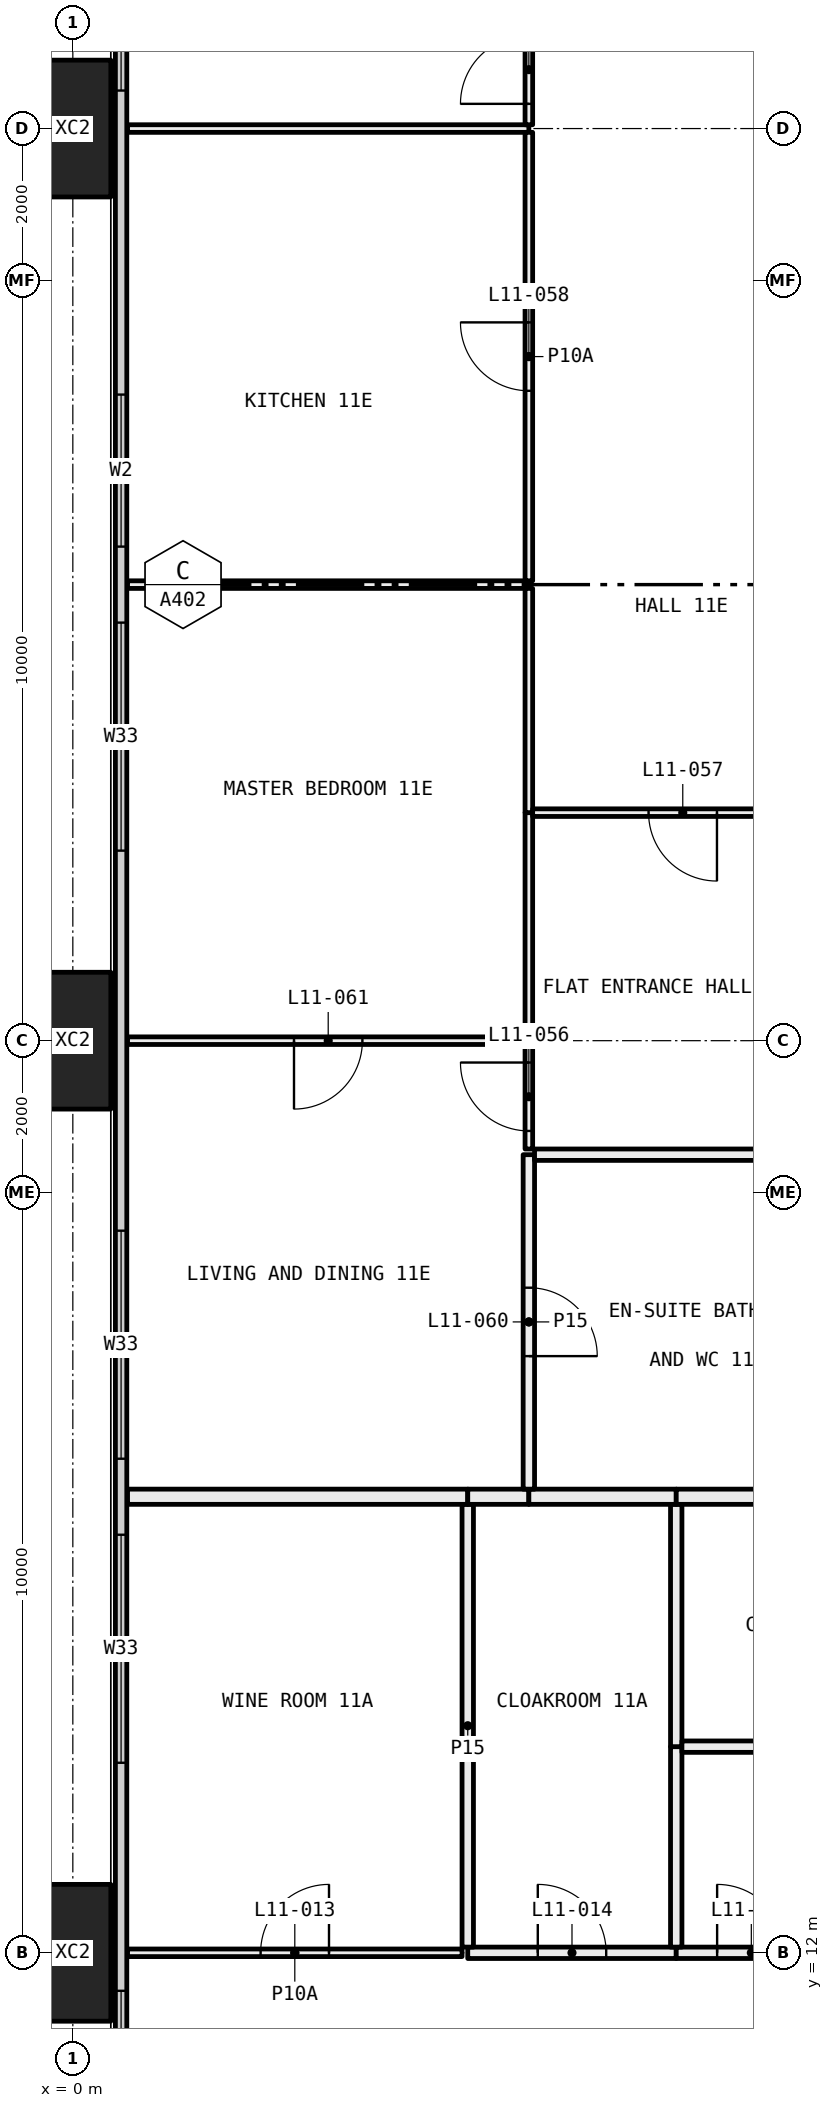
"""IFC4 building model, lengths in metres.
Left out: names, types, materials, properties, quantities, classifications, styles, units other than length and angle.
Written with IfcOpenShell. Run it as: python <this file> out.ifc"""

import sys

from ifc_helpers import new_model, si_unit, direction, frame, frame_2d, origin, origin_2d, place, context, subcontext, project, spatial, rectangle, hollow_rectangle, extrude, element, fill, save


model = new_model("IFC4")
c1 = context("Model", 3, precision=1e-05, world=origin(), true_north=direction((0.0, 1.0)))
c2 = subcontext(c1, "Body", "Model", "MODEL_VIEW")
j1 = project(units=[si_unit("LENGTHUNIT", "METRE"), si_unit("PLANEANGLEUNIT", "RADIAN")], contexts=[c1])
p1 = place(None, origin())
s1 = spatial("IfcSite", under=j1, at=p1, CompositionType="ELEMENT")
p2 = place(p1, origin())
s2 = spatial("IfcBuilding", under=s1, at=p2, CompositionType="ELEMENT")
p3 = place(p2, frame((0.0, 0.0, 50.7)))
s3 = spatial("IfcBuildingStorey", under=s2, at=p3, CompositionType="ELEMENT", Elevation=50.7)
for number, where, z_axis, x_axis in (
    (1, (0.0, 12.0, -0.4), (0.0, 0.0, 1.0), (0.0, 1.0, 0.0)),
    (2, (0.0, 24.0, -0.4), (0.0, 0.0, 1.0), (0.0, 1.0, 0.0)),
    (3, (0.0, 36.0, -0.4), (0.0, 0.0, 1.0), (0.0, 1.0, 0.0)),
):
    element("IfcColumn", number, at=place(p3, frame(where, z_axis=z_axis, x_axis=x_axis)), inside=s3, PredefinedType="COLUMN", context=c2, shape_type="SweptSolid", body=[
        extrude(hollow_rectangle(XDim=1.8, YDim=1.0, WallThickness=0.07, at=origin_2d()), origin(), (0.0, 0.0, 1.0), 3.45),
    ])
p4 = place(p3, frame((0.635, 6.71, 0.0), z_axis=(0.0, 0.0, 1.0), x_axis=(0.0, 1.0, 0.0)))
e4 = element("IfcWall", 4, at=p4, inside=s3, PredefinedType="ELEMENTEDWALL", context=c2, shape_type="SweptSolid", body=[
    extrude(rectangle(XDim=34.58, YDim=0.15, at=frame_2d((17.29, 0.0))), origin(), (0.0, 0.0, 1.0), 3.05),
])
p5 = place(p4, frame((0.29, 0.0, 0.45)))
e5 = element("IfcOpeningElement", 5, at=p5, cuts=e4, PredefinedType="OPENING", context=c2, shape_type="SweptSolid", body=[
    extrude(rectangle(XDim=4.5, YDim=2.55, at=frame_2d((2.25, 1.275))), frame((0.0, 0.085, 0.0), z_axis=(0.0, -1.0, 0.0), x_axis=(1.0, 0.0, 0.0)), (0.0, 0.0, 1.0), 0.17),
])
p6 = place(p4, frame((7.79, 0.0, 0.45)))
e6 = element("IfcOpeningElement", 6, at=p6, cuts=e4, PredefinedType="OPENING", context=c2, shape_type="SweptSolid", body=[
    extrude(rectangle(XDim=3.0, YDim=2.55, at=frame_2d((1.5, 1.275))), frame((0.0, 0.085, 0.0), z_axis=(0.0, -1.0, 0.0), x_axis=(1.0, 0.0, 0.0)), (0.0, 0.0, 1.0), 0.17),
])
p7 = place(p4, frame((11.79, 0.0, 0.45)))
e7 = element("IfcOpeningElement", 7, at=p7, cuts=e4, PredefinedType="OPENING", context=c2, shape_type="SweptSolid", body=[
    extrude(rectangle(XDim=3.0, YDim=2.55, at=frame_2d((1.5, 1.275))), frame((0.0, 0.085, 0.0), z_axis=(0.0, -1.0, 0.0), x_axis=(1.0, 0.0, 0.0)), (0.0, 0.0, 1.0), 0.17),
])
p8 = place(p4, frame((19.79, 0.0, 0.45)))
e8 = element("IfcOpeningElement", 8, at=p8, cuts=e4, PredefinedType="OPENING", context=c2, shape_type="SweptSolid", body=[
    extrude(rectangle(XDim=3.0, YDim=2.55, at=frame_2d((1.5, 1.275))), frame((0.0, 0.085, 0.0), z_axis=(0.0, -1.0, 0.0), x_axis=(1.0, 0.0, 0.0)), (0.0, 0.0, 1.0), 0.17),
])
p9 = place(p4, frame((23.79, 0.0, 0.45)))
e9 = element("IfcOpeningElement", 9, at=p9, cuts=e4, PredefinedType="OPENING", context=c2, shape_type="SweptSolid", body=[
    extrude(rectangle(XDim=2.0, YDim=2.55, at=frame_2d((1.0, 1.275))), frame((0.0, 0.085, 0.0), z_axis=(0.0, -1.0, 0.0), x_axis=(1.0, 0.0, 0.0)), (0.0, 0.0, 1.0), 0.17),
])
p10 = place(p4, frame((29.79, 0.0, 0.45)))
e10 = element("IfcOpeningElement", 10, at=p10, cuts=e4, PredefinedType="OPENING", context=c2, shape_type="SweptSolid", body=[
    extrude(rectangle(XDim=4.5, YDim=2.55, at=frame_2d((2.25, 1.275))), frame((0.0, 0.085, 0.0), z_axis=(0.0, -1.0, 0.0), x_axis=(1.0, 0.0, 0.0)), (0.0, 0.0, 1.0), 0.17),
])
p11 = place(p3, frame((5.121, 12.0, 0.0), z_axis=(0.0, 0.0, 1.0), x_axis=(-1.0, 0.0, 0.0)))
e11 = element("IfcWall", 11, at=p11, inside=s3, PredefinedType="PARTITIONING", context=c2, shape_type="SweptSolid", body=[
    extrude(rectangle(XDim=4.401, YDim=0.1, at=frame_2d((2.201, 0.0))), origin(), (0.0, 0.0, 1.0), 2.45),
])
p12 = place(p11, frame((1.75, 0.0, 0.0)))
e12 = element("IfcOpeningElement", 12, at=p12, cuts=e11, PredefinedType="OPENING", context=c2, shape_type="SweptSolid", body=[
    extrude(rectangle(XDim=0.9, YDim=2.1, at=frame_2d((0.45, 1.05))), frame((0.0, 0.06, 0.0), z_axis=(0.0, -1.0, 0.0), x_axis=(1.0, 0.0, 0.0)), (0.0, 0.0, 1.0), 0.12),
])
p13 = place(p3, frame((7.939, 12.0, 0.0), z_axis=(0.0, 0.0, 1.0), x_axis=(-1.0, 0.0, 0.0)))
e13 = element("IfcWall", 13, at=p13, inside=s3, PredefinedType="PARTITIONING", context=c2, shape_type="SweptSolid", body=[
    extrude(rectangle(XDim=2.743, YDim=0.15, at=frame_2d((1.372, 0.0))), origin(), (0.0, 0.0, 1.0), 2.45),
])
p14 = place(p13, frame((0.921, 0.0, 0.0)))
e14 = element("IfcOpeningElement", 14, at=p14, cuts=e13, PredefinedType="OPENING", context=c2, shape_type="SweptSolid", body=[
    extrude(rectangle(XDim=0.9, YDim=2.1, at=frame_2d((0.45, 1.05))), frame((0.0, 0.085, 0.0), z_axis=(0.0, -1.0, 0.0), x_axis=(1.0, 0.0, 0.0)), (0.0, 0.0, 1.0), 0.17),
])
p15 = place(p3, frame((9.915, 12.0, 0.0), z_axis=(0.0, 0.0, 1.0), x_axis=(-1.0, 0.0, 0.0)))
e15 = element("IfcWall", 15, at=p15, inside=s3, PredefinedType="PARTITIONING", context=c2, shape_type="SweptSolid", body=[
    extrude(rectangle(XDim=1.976, YDim=0.15, at=frame_2d((0.988, 0.0))), origin(), (0.0, 0.0, 1.0), 2.45),
])
p16 = place(p15, frame((0.538, 0.0, 0.0)))
e16 = element("IfcOpeningElement", 16, at=p16, cuts=e15, PredefinedType="OPENING", context=c2, shape_type="SweptSolid", body=[
    extrude(rectangle(XDim=0.9, YDim=2.1, at=frame_2d((0.45, 1.05))), frame((0.0, 0.085, 0.0), z_axis=(0.0, -1.0, 0.0), x_axis=(1.0, 0.0, 0.0)), (0.0, 0.0, 1.0), 0.17),
])
p17 = place(p3, frame((5.196, 12.075, 0.0), z_axis=(0.0, 0.0, 1.0), x_axis=(0.0, 1.0, 0.0)))
e17 = element("IfcWall", 17, at=p17, inside=s3, PredefinedType="PARTITIONING", context=c2, shape_type="SweptSolid", body=[
    extrude(rectangle(XDim=5.825, YDim=0.15, at=frame_2d((2.913, 0.0))), origin(), (0.0, 0.0, 1.0), 2.45),
])
p18 = place(p3, frame((5.196, 18.0, 0.0), z_axis=(0.0, 0.0, 1.0), x_axis=(-1.0, 0.0, 0.0)))
e18 = element("IfcWall", 18, at=p18, inside=s3, PredefinedType="PARTITIONING", context=c2, shape_type="SweptSolid", body=[
    extrude(rectangle(XDim=4.476, YDim=0.2, at=frame_2d((2.238, 0.0))), origin(), (0.0, 0.0, 1.0), 3.05),
])
p19 = place(p3, frame((7.939, 12.075, 0.0), z_axis=(0.0, 0.0, 1.0), x_axis=(0.0, 1.0, 0.0)))
e19 = element("IfcWall", 19, at=p19, inside=s3, PredefinedType="PARTITIONING", context=c2, shape_type="SweptSolid", body=[
    extrude(rectangle(XDim=2.637, YDim=0.15, at=frame_2d((1.318, 0.0))), origin(), (0.0, 0.0, 1.0), 2.45),
])
p20 = place(p3, frame((7.939, 14.712, 0.0), z_axis=(0.0, 0.0, 1.0), x_axis=(0.0, 1.0, 0.0)))
e20 = element("IfcWall", 20, at=p20, inside=s3, PredefinedType="PARTITIONING", context=c2, shape_type="SweptSolid", body=[
    extrude(rectangle(XDim=3.188, YDim=0.15, at=frame_2d((1.594, 0.0))), origin(), (0.0, 0.0, 1.0), 3.05),
])
p21 = place(p3, frame((6.0, 18.0, 0.0), z_axis=(0.0, 0.0, 1.0), x_axis=(-1.0, 0.0, 0.0)))
e21 = element("IfcWall", 21, at=p21, inside=s3, PredefinedType="PARTITIONING", context=c2, shape_type="SweptSolid", body=[
    extrude(rectangle(XDim=0.804, YDim=0.2, at=frame_2d((0.402, 0.0))), origin(), (0.0, 0.0, 1.0), 3.05),
])
p22 = place(p3, frame((7.939, 18.0, 0.0), z_axis=(0.0, 0.0, 1.0), x_axis=(-1.0, 0.0, 0.0)))
e22 = element("IfcWall", 22, at=p22, inside=s3, PredefinedType="PARTITIONING", context=c2, shape_type="SweptSolid", body=[
    extrude(rectangle(XDim=1.939, YDim=0.2, at=frame_2d((0.969, 0.0))), origin(), (0.0, 0.0, 1.0), 3.05),
])
p23 = place(p3, frame((12.364, 14.712, 0.0), z_axis=(0.0, 0.0, 1.0), x_axis=(-1.0, 0.0, 0.0)))
e23 = element("IfcWall", 23, at=p23, inside=s3, PredefinedType="PARTITIONING", context=c2, shape_type="SweptSolid", body=[
    extrude(rectangle(XDim=4.35, YDim=0.15, at=frame_2d((2.175, 0.0))), origin(), (0.0, 0.0, 1.0), 3.05),
])
p24 = place(p3, frame((10.1, 18.0, 0.0), z_axis=(0.0, 0.0, 1.0), x_axis=(-1.0, 0.0, 0.0)))
e24 = element("IfcWall", 24, at=p24, inside=s3, PredefinedType="PARTITIONING", context=c2, shape_type="SweptSolid", body=[
    extrude(rectangle(XDim=2.161, YDim=0.2, at=frame_2d((1.081, 0.0))), origin(), (0.0, 0.0, 1.0), 3.05),
])
p25 = place(p3, frame((6.0, 24.0, 0.0), z_axis=(0.0, 0.0, 1.0), x_axis=(-1.0, 0.0, 0.0)))
e25 = element("IfcWall", 25, at=p25, inside=s3, PredefinedType="PARTITIONING", context=c2, shape_type="SweptSolid", body=[
    extrude(rectangle(XDim=5.28, YDim=0.1, at=frame_2d((2.64, 0.0))), origin(), (0.0, 0.0, 1.0), 2.45),
])
p26 = place(p25, frame((2.19, 0.0, 0.0)))
e26 = element("IfcOpeningElement", 26, at=p26, cuts=e25, PredefinedType="OPENING", context=c2, shape_type="SweptSolid", body=[
    extrude(rectangle(XDim=0.9, YDim=2.1, at=frame_2d((0.45, 1.05))), frame((0.0, 0.06, 0.0), z_axis=(0.0, -1.0, 0.0), x_axis=(1.0, 0.0, 0.0)), (0.0, 0.0, 1.0), 0.12),
])
p27 = place(p3, frame((6.0, 18.1, 0.0), z_axis=(0.0, 0.0, 1.0), x_axis=(0.0, 1.0, 0.0)))
e27 = element("IfcWall", 27, at=p27, inside=s3, PredefinedType="PARTITIONING", context=c2, shape_type="SweptSolid", body=[
    extrude(rectangle(XDim=4.4, YDim=0.15, at=frame_2d((2.2, 0.0))), origin(), (0.0, 0.0, 1.0), 3.05),
])
p28 = place(p27, frame((1.75, 0.0, 0.0)))
e28 = element("IfcOpeningElement", 28, at=p28, cuts=e27, PredefinedType="OPENING", context=c2, shape_type="SweptSolid", body=[
    extrude(rectangle(XDim=0.9, YDim=2.1, at=frame_2d((0.45, 1.05))), frame((0.0, 0.085, 0.0), z_axis=(0.0, -1.0, 0.0), x_axis=(1.0, 0.0, 0.0)), (0.0, 0.0, 1.0), 0.17),
])
p29 = place(p3, frame((6.0, 22.575, 0.0), z_axis=(0.0, 0.0, 1.0), x_axis=(0.0, 1.0, 0.0)))
e29 = element("IfcWall", 29, at=p29, inside=s3, PredefinedType="PARTITIONING", context=c2, shape_type="SweptSolid", body=[
    extrude(rectangle(XDim=1.375, YDim=0.1, at=frame_2d((0.688, 0.0))), origin(), (0.0, 0.0, 1.0), 2.45),
])
p30 = place(p29, frame((0.238, 0.0, 0.0)))
e30 = element("IfcOpeningElement", 30, at=p30, cuts=e29, PredefinedType="OPENING", context=c2, shape_type="SweptSolid", body=[
    extrude(rectangle(XDim=0.9, YDim=2.1, at=frame_2d((0.45, 1.05))), frame((0.0, 0.06, 0.0), z_axis=(0.0, -1.0, 0.0), x_axis=(1.0, 0.0, 0.0)), (0.0, 0.0, 1.0), 0.12),
])
p31 = place(p3, frame((6.0, 30.0, 0.0), z_axis=(0.0, 0.0, 1.0), x_axis=(-1.0, 0.0, 0.0)))
e31 = element("IfcWall", 31, at=p31, inside=s3, PredefinedType="PARTITIONING", context=c2, shape_type="SweptSolid", body=[
    extrude(rectangle(XDim=5.28, YDim=0.1, at=frame_2d((2.64, 0.0))), origin(), (0.0, 0.0, 1.0), 3.05),
])
p32 = place(p3, frame((6.0, 24.05, 0.0), z_axis=(0.0, 0.0, 1.0), x_axis=(0.0, 1.0, 0.0)))
e32 = element("IfcWall", 32, at=p32, inside=s3, PredefinedType="PARTITIONING", context=c2, shape_type="SweptSolid", body=[
    extrude(rectangle(XDim=2.95, YDim=0.1, at=frame_2d((1.475, 0.0))), origin(), (0.0, 0.0, 1.0), 2.45),
])
p33 = place(p3, frame((6.0, 27.0, 0.0), z_axis=(0.0, 0.0, 1.0), x_axis=(0.0, 1.0, 0.0)))
e33 = element("IfcWall", 33, at=p33, inside=s3, PredefinedType="PARTITIONING", context=c2, shape_type="SweptSolid", body=[
    extrude(rectangle(XDim=2.95, YDim=0.1, at=frame_2d((1.475, 0.0))), origin(), (0.0, 0.0, 1.0), 3.05),
])
p34 = place(p3, frame((6.0, 36.0, 0.0), z_axis=(0.0, 0.0, 1.0), x_axis=(-1.0, 0.0, 0.0)))
e34 = element("IfcWall", 34, at=p34, inside=s3, PredefinedType="PARTITIONING", context=c2, shape_type="SweptSolid", body=[
    extrude(rectangle(XDim=5.28, YDim=0.1, at=frame_2d((2.64, 0.0))), origin(), (0.0, 0.0, 1.0), 2.45),
])
p35 = place(p3, frame((6.0, 30.05, 0.0), z_axis=(0.0, 0.0, 1.0), x_axis=(0.0, 1.0, 0.0)))
e35 = element("IfcWall", 35, at=p35, inside=s3, PredefinedType="PARTITIONING", context=c2, shape_type="SweptSolid", body=[
    extrude(rectangle(XDim=5.9, YDim=0.1, at=frame_2d((2.95, 0.0))), origin(), (0.0, 0.0, 1.0), 2.45),
])
p36 = place(p35, frame((2.5, 0.0, 0.0)))
e36 = element("IfcOpeningElement", 36, at=p36, cuts=e35, PredefinedType="OPENING", context=c2, shape_type="SweptSolid", body=[
    extrude(rectangle(XDim=0.9, YDim=2.1, at=frame_2d((0.45, 1.05))), frame((0.0, 0.06, 0.0), z_axis=(0.0, -1.0, 0.0), x_axis=(1.0, 0.0, 0.0)), (0.0, 0.0, 1.0), 0.12),
])
p37 = place(p3, frame((6.0, 36.05, 0.0), z_axis=(0.0, 0.0, 1.0), x_axis=(0.0, 1.0, 0.0)))
e37 = element("IfcWall", 37, at=p37, inside=s3, PredefinedType="PARTITIONING", context=c2, shape_type="SweptSolid", body=[
    extrude(rectangle(XDim=1.45, YDim=0.1, at=frame_2d((0.725, 0.0))), origin(), (0.0, 0.0, 1.0), 2.45),
])
p38 = place(p37, frame((0.275, 0.0, 0.0)))
e38 = element("IfcOpeningElement", 38, at=p38, cuts=e37, PredefinedType="OPENING", context=c2, shape_type="SweptSolid", body=[
    extrude(rectangle(XDim=0.9, YDim=2.1, at=frame_2d((0.45, 1.05))), frame((0.0, 0.06, 0.0), z_axis=(0.0, -1.0, 0.0), x_axis=(1.0, 0.0, 0.0)), (0.0, 0.0, 1.0), 0.12),
])
p39 = place(p3, frame((10.0, 22.5, 0.0), z_axis=(0.0, 0.0, 1.0), x_axis=(-1.0, 0.0, 0.0)))
e39 = element("IfcWall", 39, at=p39, inside=s3, PredefinedType="PARTITIONING", context=c2, shape_type="SweptSolid", body=[
    extrude(rectangle(XDim=3.925, YDim=0.15, at=frame_2d((1.962, 0.0))), origin(), (0.0, 0.0, 1.0), 3.05),
])
p40 = place(p3, frame((10.0, 27.0, 0.0), z_axis=(0.0, 0.0, 1.0), x_axis=(-1.0, 0.0, 0.0)))
e40 = element("IfcWall", 40, at=p40, inside=s3, PredefinedType="PARTITIONING", context=c2, shape_type="SweptSolid", body=[
    extrude(rectangle(XDim=3.95, YDim=0.1, at=frame_2d((1.975, 0.0))), origin(), (0.0, 0.0, 1.0), 3.05),
])
p41 = place(p40, frame((1.525, 0.0, 0.0)))
e41 = element("IfcOpeningElement", 41, at=p41, cuts=e40, PredefinedType="OPENING", context=c2, shape_type="SweptSolid", body=[
    extrude(rectangle(XDim=0.9, YDim=2.1, at=frame_2d((0.45, 1.05))), frame((0.0, 0.06, 0.0), z_axis=(0.0, -1.0, 0.0), x_axis=(1.0, 0.0, 0.0)), (0.0, 0.0, 1.0), 0.12),
])
p42 = place(p5, origin())
e42 = element("IfcWindow", 42, at=p42, inside=s3, PartitioningType="SINGLE_PANEL", PredefinedType="WINDOW", context=c2, shape_type="SweptSolid", body=[
    extrude(rectangle(XDim=4.5, YDim=2.55, at=frame_2d((2.25, 1.275))), frame((0.0, 0.03, 0.0), z_axis=(0.0, -1.0, 0.0), x_axis=(1.0, 0.0, 0.0)), (0.0, 0.0, 1.0), 0.06),
])
fill(e5, e42)
p43 = place(p6, origin())
e43 = element("IfcWindow", 43, at=p43, inside=s3, PartitioningType="SINGLE_PANEL", PredefinedType="WINDOW", context=c2, shape_type="SweptSolid", body=[
    extrude(rectangle(XDim=3.0, YDim=2.55, at=frame_2d((1.5, 1.275))), frame((0.0, 0.03, 0.0), z_axis=(0.0, -1.0, 0.0), x_axis=(1.0, 0.0, 0.0)), (0.0, 0.0, 1.0), 0.06),
])
fill(e6, e43)
p44 = place(p7, origin())
e44 = element("IfcWindow", 44, at=p44, inside=s3, PartitioningType="SINGLE_PANEL", PredefinedType="WINDOW", context=c2, shape_type="SweptSolid", body=[
    extrude(rectangle(XDim=3.0, YDim=2.55, at=frame_2d((1.5, 1.275))), frame((0.0, 0.03, 0.0), z_axis=(0.0, -1.0, 0.0), x_axis=(1.0, 0.0, 0.0)), (0.0, 0.0, 1.0), 0.06),
])
fill(e7, e44)
p45 = place(p8, origin())
e45 = element("IfcWindow", 45, at=p45, inside=s3, PartitioningType="SINGLE_PANEL", PredefinedType="WINDOW", context=c2, shape_type="SweptSolid", body=[
    extrude(rectangle(XDim=3.0, YDim=2.55, at=frame_2d((1.5, 1.275))), frame((0.0, 0.03, 0.0), z_axis=(0.0, -1.0, 0.0), x_axis=(1.0, 0.0, 0.0)), (0.0, 0.0, 1.0), 0.06),
])
fill(e8, e45)
p46 = place(p9, origin())
e46 = element("IfcWindow", 46, at=p46, inside=s3, PartitioningType="SINGLE_PANEL", PredefinedType="WINDOW", context=c2, shape_type="SweptSolid", body=[
    extrude(rectangle(XDim=2.0, YDim=2.55, at=frame_2d((1.0, 1.275))), frame((0.0, 0.03, 0.0), z_axis=(0.0, -1.0, 0.0), x_axis=(1.0, 0.0, 0.0)), (0.0, 0.0, 1.0), 0.06),
])
fill(e9, e46)
p47 = place(p10, origin())
e47 = element("IfcWindow", 47, at=p47, inside=s3, PartitioningType="SINGLE_PANEL", PredefinedType="WINDOW", context=c2, shape_type="SweptSolid", body=[
    extrude(rectangle(XDim=4.5, YDim=2.55, at=frame_2d((2.25, 1.275))), frame((0.0, 0.03, 0.0), z_axis=(0.0, -1.0, 0.0), x_axis=(1.0, 0.0, 0.0)), (0.0, 0.0, 1.0), 0.06),
])
fill(e10, e47)
p48 = place(p12, frame((0.9, 0.0, 0.0), x_axis=(-1.0, 0.0, 0.0)))
e48 = element("IfcDoor", 48, at=p48, inside=s3, OperationType="SINGLE_SWING_LEFT", PredefinedType="DOOR", context=c2, shape_type="SweptSolid", body=[
    extrude(rectangle(XDim=0.9, YDim=2.1, at=frame_2d((0.45, 1.05))), frame((0.0, 0.025, 0.0), z_axis=(0.0, -1.0, 0.0), x_axis=(1.0, 0.0, 0.0)), (0.0, 0.0, 1.0), 0.05),
])
fill(e12, e48)
p49 = place(p14, frame((0.9, 0.0, 0.0), x_axis=(-1.0, 0.0, 0.0)))
e49 = element("IfcDoor", 49, at=p49, inside=s3, OperationType="SINGLE_SWING_RIGHT", PredefinedType="DOOR", context=c2, shape_type="SweptSolid", body=[
    extrude(rectangle(XDim=0.9, YDim=2.1, at=frame_2d((0.45, 1.05))), frame((0.0, 0.025, 0.0), z_axis=(0.0, -1.0, 0.0), x_axis=(1.0, 0.0, 0.0)), (0.0, 0.0, 1.0), 0.05),
])
fill(e14, e49)
p50 = place(p16, frame((0.9, 0.0, 0.0), x_axis=(-1.0, 0.0, 0.0)))
e50 = element("IfcDoor", 50, at=p50, inside=s3, OperationType="SINGLE_SWING_RIGHT", PredefinedType="DOOR", context=c2, shape_type="SweptSolid", body=[
    extrude(rectangle(XDim=0.9, YDim=2.1, at=frame_2d((0.45, 1.05))), frame((0.0, 0.025, 0.0), z_axis=(0.0, -1.0, 0.0), x_axis=(1.0, 0.0, 0.0)), (0.0, 0.0, 1.0), 0.05),
])
fill(e16, e50)
p51 = place(p30, origin())
e51 = element("IfcDoor", 51, at=p51, inside=s3, OperationType="SINGLE_SWING_LEFT", PredefinedType="DOOR", context=c2, shape_type="SweptSolid", body=[
    extrude(rectangle(XDim=0.9, YDim=2.1, at=frame_2d((0.45, 1.05))), frame((0.0, 0.025, 0.0), z_axis=(0.0, -1.0, 0.0), x_axis=(1.0, 0.0, 0.0)), (0.0, 0.0, 1.0), 0.05),
])
fill(e30, e51)
p52 = place(p41, origin())
e52 = element("IfcDoor", 52, at=p52, inside=s3, OperationType="SINGLE_SWING_RIGHT", PredefinedType="DOOR", context=c2, shape_type="SweptSolid", body=[
    extrude(rectangle(XDim=0.9, YDim=2.1, at=frame_2d((0.45, 1.05))), frame((0.0, 0.025, 0.0), z_axis=(0.0, -1.0, 0.0), x_axis=(1.0, 0.0, 0.0)), (0.0, 0.0, 1.0), 0.05),
])
fill(e41, e52)
p53 = place(p36, origin())
e53 = element("IfcDoor", 53, at=p53, inside=s3, OperationType="SINGLE_SWING_LEFT", PredefinedType="DOOR", context=c2, shape_type="SweptSolid", body=[
    extrude(rectangle(XDim=0.9, YDim=2.1, at=frame_2d((0.45, 1.05))), frame((0.0, 0.025, 0.0), z_axis=(0.0, -1.0, 0.0), x_axis=(1.0, 0.0, 0.0)), (0.0, 0.0, 1.0), 0.05),
])
fill(e36, e53)
p54 = place(p38, origin())
e54 = element("IfcDoor", 54, at=p54, inside=s3, OperationType="SINGLE_SWING_RIGHT", PredefinedType="DOOR", context=c2, shape_type="SweptSolid", body=[
    extrude(rectangle(XDim=0.9, YDim=2.1, at=frame_2d((0.45, 1.05))), frame((0.0, 0.025, 0.0), z_axis=(0.0, -1.0, 0.0), x_axis=(1.0, 0.0, 0.0)), (0.0, 0.0, 1.0), 0.05),
])
fill(e38, e54)
p55 = place(p28, frame((0.9, 0.0, 0.0), x_axis=(-1.0, 0.0, 0.0)))
e55 = element("IfcDoor", 55, at=p55, inside=s3, OperationType="SINGLE_SWING_LEFT", PredefinedType="DOOR", context=c2, shape_type="SweptSolid", body=[
    extrude(rectangle(XDim=0.9, YDim=2.1, at=frame_2d((0.45, 1.05))), frame((0.0, 0.025, 0.0), z_axis=(0.0, -1.0, 0.0), x_axis=(1.0, 0.0, 0.0)), (0.0, 0.0, 1.0), 0.05),
])
fill(e28, e55)
p56 = place(p26, origin())
e56 = element("IfcDoor", 56, at=p56, inside=s3, OperationType="SINGLE_SWING_LEFT", PredefinedType="DOOR", context=c2, shape_type="SweptSolid", body=[
    extrude(rectangle(XDim=0.9, YDim=2.1, at=frame_2d((0.45, 1.05))), frame((0.0, 0.025, 0.0), z_axis=(0.0, -1.0, 0.0), x_axis=(1.0, 0.0, 0.0)), (0.0, 0.0, 1.0), 0.05),
])
fill(e26, e56)
save(model, sys.argv[1])
